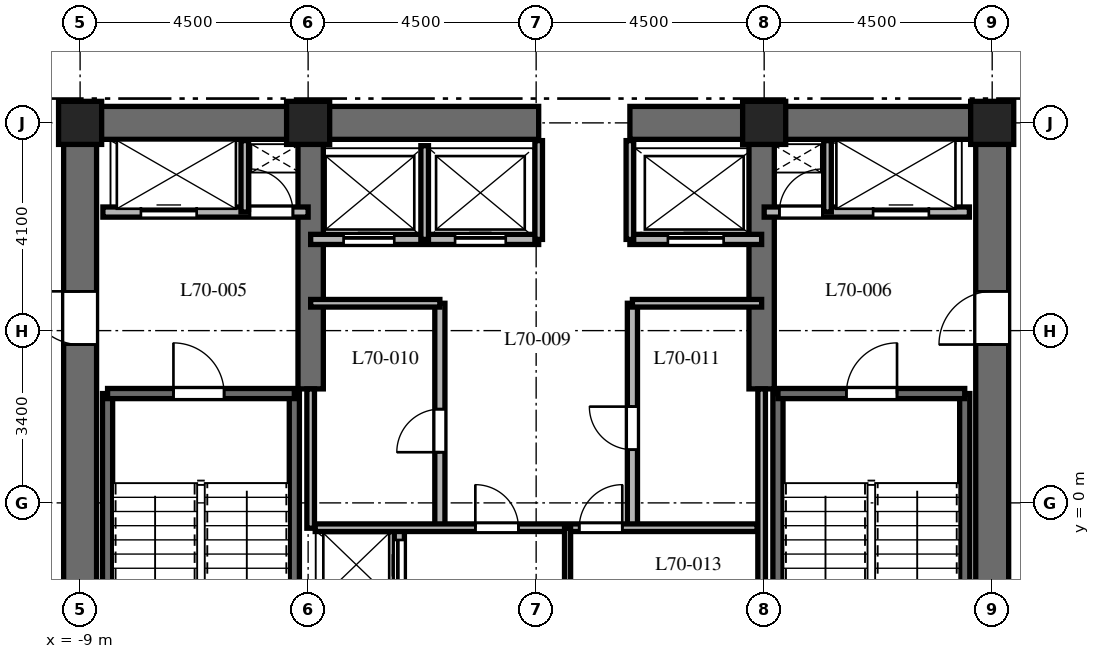
"""IFC4 building model, lengths in metres.
Left out: names, types, materials, properties, quantities, classifications, styles, units other than length and angle.
Written with IfcOpenShell. Run it as: python <this file> out.ifc"""

import sys

from ifc_helpers import new_model, si_unit, direction, frame, frame_2d, origin, origin_2d, place, context, subcontext, project, spatial, rectangle, extrude, element, fill, save


model = new_model("IFC4")
c1 = context("Model", 3, precision=1e-05, world=origin(), true_north=direction((0.0, 1.0)))
c2 = subcontext(c1, "Body", "Model", "MODEL_VIEW")
j1 = project(units=[si_unit("LENGTHUNIT", "METRE"), si_unit("PLANEANGLEUNIT", "RADIAN")], contexts=[c1])
p1 = place(None, origin())
s1 = spatial("IfcSite", under=j1, at=p1, CompositionType="ELEMENT")
p2 = place(p1, origin())
s2 = spatial("IfcBuilding", under=s1, at=p2, CompositionType="ELEMENT")
p3 = place(p2, frame((0.0, 0.0, 280.8)))
s3 = spatial("IfcBuildingStorey", under=s2, at=p3, CompositionType="ELEMENT", Elevation=280.8)
p4 = place(p3, frame((-9.325, 7.5, 0.0), z_axis=(0.0, 0.0, 1.0), x_axis=(1.0, 0.0, 0.0)))
e1 = element("IfcWall", 1, at=p4, inside=s3, PredefinedType="SHEAR", context=c2, shape_type="SweptSolid", body=[
    extrude(rectangle(XDim=9.375, YDim=0.65, at=frame_2d((4.688, 0.0))), origin(), (0.0, 0.0, 1.0), 3.9),
])
p5 = place(p3, frame((1.85, 7.5, 0.0), z_axis=(0.0, 0.0, 1.0), x_axis=(1.0, 0.0, 0.0)))
e2 = element("IfcWall", 2, at=p5, inside=s3, PredefinedType="SHEAR", context=c2, shape_type="SweptSolid", body=[
    extrude(rectangle(XDim=7.475, YDim=0.65, at=frame_2d((3.737, 0.0))), origin(), (0.0, 0.0, 1.0), 3.9),
])
p6 = place(p3, frame((-9.0, -7.175, 0.0), z_axis=(0.0, 0.0, 1.0), x_axis=(0.0, 1.0, 0.0)))
e3 = element("IfcWall", 3, at=p6, inside=s3, PredefinedType="SHEAR", context=c2, shape_type="SweptSolid", body=[
    extrude(rectangle(XDim=14.35, YDim=0.65, at=frame_2d((7.175, 0.0))), origin(), (0.0, 0.0, 1.0), 3.9),
])
p7 = place(p6, frame((10.3, 0.0, 0.0)))
e4 = element("IfcOpeningElement", 4, at=p7, cuts=e3, PredefinedType="OPENING", context=c2, shape_type="SweptSolid", body=[
    extrude(rectangle(XDim=1.05, YDim=2.15, at=frame_2d((0.525, 1.075))), frame((0.0, 0.335, 0.0), z_axis=(0.0, -1.0, 0.0), x_axis=(1.0, 0.0, 0.0)), (0.0, 0.0, 1.0), 0.67),
])
p8 = place(p3, frame((9.0, -7.175, 0.0), z_axis=(0.0, 0.0, 1.0), x_axis=(0.0, 1.0, 0.0)))
e5 = element("IfcWall", 5, at=p8, inside=s3, PredefinedType="SHEAR", context=c2, shape_type="SweptSolid", body=[
    extrude(rectangle(XDim=14.35, YDim=0.65, at=frame_2d((7.175, 0.0))), origin(), (0.0, 0.0, 1.0), 3.9),
])
p9 = place(p8, frame((10.3, 0.0, 0.0)))
e6 = element("IfcOpeningElement", 6, at=p9, cuts=e5, PredefinedType="OPENING", context=c2, shape_type="SweptSolid", body=[
    extrude(rectangle(XDim=1.05, YDim=2.15, at=frame_2d((0.525, 1.075))), frame((0.0, 0.335, 0.0), z_axis=(0.0, -1.0, 0.0), x_axis=(1.0, 0.0, 0.0)), (0.0, 0.0, 1.0), 0.67),
])
for number, where, z_axis, x_axis in (
    (7, (-4.45, 2.25, 0.0), (0.0, 0.0, 1.0), (0.0, 1.0, 0.0)),
    (8, (4.45, 2.25, 0.0), (0.0, 0.0, 1.0), (0.0, 1.0, 0.0)),
):
    element("IfcWall", number, at=place(p3, frame(where, z_axis=z_axis, x_axis=x_axis)), inside=s3, PredefinedType="SHEAR", context=c2, shape_type="SweptSolid", body=[
        extrude(rectangle(XDim=4.925, YDim=0.5, at=frame_2d((2.462, 0.0))), origin(), (0.0, 0.0, 1.0), 3.9),
    ])
for number, where, z_axis, x_axis in (
    (9, (-8.458, -6.985, 0.0), (0.0, 0.0, 1.0), (0.0, 1.0, 0.0)),
    (10, (-4.772, -6.985, 0.0), (0.0, 0.0, 1.0), (0.0, 1.0, 0.0)),
):
    element("IfcWall", number, at=place(p3, frame(where, z_axis=z_axis, x_axis=x_axis)), inside=s3, PredefinedType="SHEAR", context=c2, shape_type="SweptSolid", body=[
        extrude(rectangle(XDim=9.143, YDim=0.2, at=frame_2d((4.572, 0.0))), origin(), (0.0, 0.0, 1.0), 3.9),
    ])
p10 = place(p3, frame((-8.458, 2.158, 0.0), z_axis=(0.0, 0.0, 1.0), x_axis=(1.0, 0.0, 0.0)))
e11 = element("IfcWall", 11, at=p10, inside=s3, PredefinedType="SHEAR", context=c2, shape_type="SweptSolid", body=[
    extrude(rectangle(XDim=3.686, YDim=0.2, at=frame_2d((1.843, 0.0))), origin(), (0.0, 0.0, 1.0), 3.9),
])
p11 = place(p10, frame((1.3, 0.0, 0.0)))
e12 = element("IfcOpeningElement", 12, at=p11, cuts=e11, PredefinedType="OPENING", context=c2, shape_type="SweptSolid", body=[
    extrude(rectangle(XDim=1.0, YDim=2.15, at=frame_2d((0.5, 1.075))), frame((0.0, 0.11, 0.0), z_axis=(0.0, -1.0, 0.0), x_axis=(1.0, 0.0, 0.0)), (0.0, 0.0, 1.0), 0.22),
])
for number, where, z_axis, x_axis in (
    (13, (4.772, -6.985, 0.0), (0.0, 0.0, 1.0), (0.0, 1.0, 0.0)),
    (14, (8.458, -6.985, 0.0), (0.0, 0.0, 1.0), (0.0, 1.0, 0.0)),
):
    element("IfcWall", number, at=place(p3, frame(where, z_axis=z_axis, x_axis=x_axis)), inside=s3, PredefinedType="SHEAR", context=c2, shape_type="SweptSolid", body=[
        extrude(rectangle(XDim=9.143, YDim=0.2, at=frame_2d((4.572, 0.0))), origin(), (0.0, 0.0, 1.0), 3.9),
    ])
p12 = place(p3, frame((4.772, 2.158, 0.0), z_axis=(0.0, 0.0, 1.0), x_axis=(1.0, 0.0, 0.0)))
e15 = element("IfcWall", 15, at=p12, inside=s3, PredefinedType="SHEAR", context=c2, shape_type="SweptSolid", body=[
    extrude(rectangle(XDim=3.686, YDim=0.2, at=frame_2d((1.843, 0.0))), origin(), (0.0, 0.0, 1.0), 3.9),
])
p13 = place(p12, frame((1.35, 0.0, 0.0)))
e16 = element("IfcOpeningElement", 16, at=p13, cuts=e15, PredefinedType="OPENING", context=c2, shape_type="SweptSolid", body=[
    extrude(rectangle(XDim=1.0, YDim=2.15, at=frame_2d((0.5, 1.075))), frame((0.0, 0.11, 0.0), z_axis=(0.0, -1.0, 0.0), x_axis=(1.0, 0.0, 0.0)), (0.0, 0.0, 1.0), 0.22),
])
for number, where, z_axis, x_axis in (
    (17, (9.0, 7.5, 0.0), (0.0, 0.0, 1.0), (1.0, 0.0, 0.0)),
    (18, (4.5, 7.5, 0.0), (0.0, 0.0, 1.0), (1.0, 0.0, 0.0)),
    (19, (-4.5, 7.5, 0.0), (0.0, 0.0, 1.0), (1.0, 0.0, 0.0)),
    (20, (-9.0, 7.5, 0.0), (0.0, 0.0, 1.0), (1.0, 0.0, 0.0)),
):
    element("IfcColumn", number, at=place(p3, frame(where, z_axis=z_axis, x_axis=x_axis)), inside=s3, PredefinedType="COLUMN", context=c2, shape_type="SweptSolid", body=[
        extrude(rectangle(XDim=0.85, YDim=0.85, at=origin_2d()), origin(), (0.0, 0.0, 1.0), 3.9),
    ])
p14 = place(p3, frame((-8.55, 5.74, 0.0), z_axis=(0.0, 0.0, 1.0), x_axis=(1.0, 0.0, 0.0)))
e21 = element("IfcWall", 21, at=p14, inside=s3, PredefinedType="PARTITIONING", context=c2, shape_type="SweptSolid", body=[
    extrude(rectangle(XDim=4.05, YDim=0.2, at=frame_2d((2.025, 0.0))), origin(), (0.0, 0.0, 1.0), 3.6),
])
p15 = place(p14, frame((0.75, 0.0, 0.0)))
e22 = element("IfcOpeningElement", 22, at=p15, cuts=e21, PredefinedType="OPENING", context=c2, shape_type="SweptSolid", body=[
    extrude(rectangle(XDim=1.1, YDim=2.2, at=frame_2d((0.55, 1.1))), frame((0.0, 0.11, 0.0), z_axis=(0.0, -1.0, 0.0), x_axis=(1.0, 0.0, 0.0)), (0.0, 0.0, 1.0), 0.22),
])
p16 = place(p14, frame((2.9, 0.0, 0.0)))
e23 = element("IfcOpeningElement", 23, at=p16, cuts=e21, PredefinedType="OPENING", context=c2, shape_type="SweptSolid", body=[
    extrude(rectangle(XDim=0.85, YDim=2.03, at=frame_2d((0.425, 1.015))), frame((0.0, 0.11, 0.0), z_axis=(0.0, -1.0, 0.0), x_axis=(1.0, 0.0, 0.0)), (0.0, 0.0, 1.0), 0.22),
])
p17 = place(p3, frame((-5.75, 5.74, 0.0), z_axis=(0.0, 0.0, 1.0), x_axis=(0.0, 1.0, 0.0)))
e24 = element("IfcWall", 24, at=p17, inside=s3, PredefinedType="PARTITIONING", context=c2, shape_type="SweptSolid", body=[
    extrude(rectangle(XDim=1.41, YDim=0.15, at=frame_2d((0.705, 0.0))), origin(), (0.0, 0.0, 1.0), 3.6),
])
p18 = place(p3, frame((4.5, 5.74, 0.0), z_axis=(0.0, 0.0, 1.0), x_axis=(1.0, 0.0, 0.0)))
e25 = element("IfcWall", 25, at=p18, inside=s3, PredefinedType="PARTITIONING", context=c2, shape_type="SweptSolid", body=[
    extrude(rectangle(XDim=4.05, YDim=0.2, at=frame_2d((2.025, 0.0))), origin(), (0.0, 0.0, 1.0), 3.6),
])
p19 = place(p18, frame((0.3, 0.0, 0.0)))
e26 = element("IfcOpeningElement", 26, at=p19, cuts=e25, PredefinedType="OPENING", context=c2, shape_type="SweptSolid", body=[
    extrude(rectangle(XDim=0.85, YDim=2.03, at=frame_2d((0.425, 1.015))), frame((0.0, 0.11, 0.0), z_axis=(0.0, -1.0, 0.0), x_axis=(1.0, 0.0, 0.0)), (0.0, 0.0, 1.0), 0.22),
])
p20 = place(p18, frame((2.15, 0.0, 0.0)))
e27 = element("IfcOpeningElement", 27, at=p20, cuts=e25, PredefinedType="OPENING", context=c2, shape_type="SweptSolid", body=[
    extrude(rectangle(XDim=1.1, YDim=2.2, at=frame_2d((0.55, 1.1))), frame((0.0, 0.11, 0.0), z_axis=(0.0, -1.0, 0.0), x_axis=(1.0, 0.0, 0.0)), (0.0, 0.0, 1.0), 0.22),
])
p21 = place(p3, frame((5.75, 5.74, 0.0), z_axis=(0.0, 0.0, 1.0), x_axis=(0.0, 1.0, 0.0)))
e28 = element("IfcWall", 28, at=p21, inside=s3, PredefinedType="PARTITIONING", context=c2, shape_type="SweptSolid", body=[
    extrude(rectangle(XDim=1.41, YDim=0.15, at=frame_2d((0.705, 0.0))), origin(), (0.0, 0.0, 1.0), 3.6),
])
p22 = place(p3, frame((-2.7, -1.972, 0.0), z_axis=(0.0, 0.0, 1.0), x_axis=(0.0, 1.0, 0.0)))
e29 = element("IfcWall", 29, at=p22, inside=s3, PredefinedType="PARTITIONING", context=c2, shape_type="SweptSolid", body=[
    extrude(rectangle(XDim=1.472, YDim=0.2, at=frame_2d((0.736, 0.0))), origin(), (0.0, 0.0, 1.0), 3.6),
])
p23 = place(p22, frame((0.24, 0.0, 0.0)))
e30 = element("IfcOpeningElement", 30, at=p23, cuts=e29, PredefinedType="OPENING", context=c2, shape_type="SweptSolid", body=[
    extrude(rectangle(XDim=1.0, YDim=2.2, at=frame_2d((0.5, 1.1))), frame((0.0, 0.11, 0.0), z_axis=(0.0, -1.0, 0.0), x_axis=(1.0, 0.0, 0.0)), (0.0, 0.0, 1.0), 0.22),
])
p24 = place(p3, frame((-4.45, 5.2, 0.0), z_axis=(0.0, 0.0, 1.0), x_axis=(1.0, 0.0, 0.0)))
e31 = element("IfcWall", 31, at=p24, inside=s3, PredefinedType="PARTITIONING", context=c2, shape_type="SweptSolid", body=[
    extrude(rectangle(XDim=4.5, YDim=0.2, at=frame_2d((2.25, 0.0))), origin(), (0.0, 0.0, 1.0), 3.6),
])
p25 = place(p24, frame((0.65, 0.0, 0.0)))
e32 = element("IfcOpeningElement", 32, at=p25, cuts=e31, PredefinedType="OPENING", context=c2, shape_type="SweptSolid", body=[
    extrude(rectangle(XDim=1.0, YDim=2.2, at=frame_2d((0.5, 1.1))), frame((0.0, 0.11, 0.0), z_axis=(0.0, -1.0, 0.0), x_axis=(1.0, 0.0, 0.0)), (0.0, 0.0, 1.0), 0.22),
])
p26 = place(p24, frame((2.85, 0.0, 0.0)))
e33 = element("IfcOpeningElement", 33, at=p26, cuts=e31, PredefinedType="OPENING", context=c2, shape_type="SweptSolid", body=[
    extrude(rectangle(XDim=1.0, YDim=2.2, at=frame_2d((0.5, 1.1))), frame((0.0, 0.11, 0.0), z_axis=(0.0, -1.0, 0.0), x_axis=(1.0, 0.0, 0.0)), (0.0, 0.0, 1.0), 0.22),
])
p27 = place(p3, frame((1.85, 5.2, 0.0), z_axis=(0.0, 0.0, 1.0), x_axis=(1.0, 0.0, 0.0)))
e34 = element("IfcWall", 34, at=p27, inside=s3, PredefinedType="PARTITIONING", context=c2, shape_type="SweptSolid", body=[
    extrude(rectangle(XDim=2.6, YDim=0.2, at=frame_2d((1.3, 0.0))), origin(), (0.0, 0.0, 1.0), 3.6),
])
p28 = place(p27, frame((0.75, 0.0, 0.0)))
e35 = element("IfcOpeningElement", 35, at=p28, cuts=e34, PredefinedType="OPENING", context=c2, shape_type="SweptSolid", body=[
    extrude(rectangle(XDim=1.1, YDim=2.2, at=frame_2d((0.55, 1.1))), frame((0.0, 0.11, 0.0), z_axis=(0.0, -1.0, 0.0), x_axis=(1.0, 0.0, 0.0)), (0.0, 0.0, 1.0), 0.22),
])
p29 = place(p3, frame((-2.2, 5.2, 0.0), z_axis=(0.0, 0.0, 1.0), x_axis=(0.0, 1.0, 0.0)))
e36 = element("IfcWall", 36, at=p29, inside=s3, PredefinedType="PARTITIONING", context=c2, shape_type="SweptSolid", body=[
    extrude(rectangle(XDim=1.85, YDim=0.15, at=frame_2d((0.925, 0.0))), origin(), (0.0, 0.0, 1.0), 3.6),
])
for number, where, z_axis, x_axis in (
    (37, (0.05, 5.2, 0.0), (0.0, 0.0, 1.0), (0.0, 1.0, 0.0)),
    (38, (1.85, 5.2, 0.0), (0.0, 0.0, 1.0), (0.0, 1.0, 0.0)),
):
    element("IfcWall", number, at=place(p3, frame(where, z_axis=z_axis, x_axis=x_axis)), inside=s3, PredefinedType="PARTITIONING", context=c2, shape_type="SweptSolid", body=[
        extrude(rectangle(XDim=1.95, YDim=0.15, at=frame_2d((0.975, 0.0))), origin(), (0.0, 0.0, 1.0), 3.6),
    ])
p30 = place(p3, frame((-4.45, -0.5, 0.0), z_axis=(0.0, 0.0, 1.0), x_axis=(0.0, 1.0, 0.0)))
e39 = element("IfcWall", 39, at=p30, inside=s3, PredefinedType="PARTITIONING", context=c2, shape_type="SweptSolid", body=[
    extrude(rectangle(XDim=2.75, YDim=0.15, at=frame_2d((1.375, 0.0))), origin(), (0.0, 0.0, 1.0), 3.6),
])
p31 = place(p3, frame((4.45, -1.972, 0.0), z_axis=(0.0, 0.0, 1.0), x_axis=(0.0, 1.0, 0.0)))
e40 = element("IfcWall", 40, at=p31, inside=s3, PredefinedType="PARTITIONING", context=c2, shape_type="SweptSolid", body=[
    extrude(rectangle(XDim=4.222, YDim=0.15, at=frame_2d((2.111, 0.0))), origin(), (0.0, 0.0, 1.0), 3.6),
])
p32 = place(p3, frame((-1.9, -0.5, 0.0), z_axis=(0.0, 0.0, 1.0), x_axis=(0.0, 1.0, 0.0)))
e41 = element("IfcWall", 41, at=p32, inside=s3, PredefinedType="PARTITIONING", context=c2, shape_type="SweptSolid", body=[
    extrude(rectangle(XDim=4.44, YDim=0.2, at=frame_2d((2.22, 0.0))), origin(), (0.0, 0.0, 1.0), 3.6),
])
p33 = place(p32, frame((1.5, 0.0, 0.0)))
e42 = element("IfcOpeningElement", 42, at=p33, cuts=e41, PredefinedType="OPENING", context=c2, shape_type="SweptSolid", body=[
    extrude(rectangle(XDim=0.85, YDim=2.03, at=frame_2d((0.425, 1.015))), frame((0.0, 0.11, 0.0), z_axis=(0.0, -1.0, 0.0), x_axis=(1.0, 0.0, 0.0)), (0.0, 0.0, 1.0), 0.22),
])
p34 = place(p3, frame((-4.45, 3.94, 0.0), z_axis=(0.0, 0.0, 1.0), x_axis=(1.0, 0.0, 0.0)))
e43 = element("IfcWall", 43, at=p34, inside=s3, PredefinedType="PARTITIONING", context=c2, shape_type="SweptSolid", body=[
    extrude(rectangle(XDim=2.55, YDim=0.15, at=frame_2d((1.275, 0.0))), origin(), (0.0, 0.0, 1.0), 3.6),
])
p35 = place(p3, frame((1.9, -0.5, 0.0), z_axis=(0.0, 0.0, 1.0), x_axis=(0.0, 1.0, 0.0)))
e44 = element("IfcWall", 44, at=p35, inside=s3, PredefinedType="PARTITIONING", context=c2, shape_type="SweptSolid", body=[
    extrude(rectangle(XDim=4.44, YDim=0.2, at=frame_2d((2.22, 0.0))), origin(), (0.0, 0.0, 1.0), 3.6),
])
p36 = place(p35, frame((1.55, 0.0, 0.0)))
e45 = element("IfcOpeningElement", 45, at=p36, cuts=e44, PredefinedType="OPENING", context=c2, shape_type="SweptSolid", body=[
    extrude(rectangle(XDim=0.85, YDim=2.03, at=frame_2d((0.425, 1.015))), frame((0.0, 0.11, 0.0), z_axis=(0.0, -1.0, 0.0), x_axis=(1.0, 0.0, 0.0)), (0.0, 0.0, 1.0), 0.22),
])
p37 = place(p3, frame((1.9, 3.94, 0.0), z_axis=(0.0, 0.0, 1.0), x_axis=(1.0, 0.0, 0.0)))
e46 = element("IfcWall", 46, at=p37, inside=s3, PredefinedType="PARTITIONING", context=c2, shape_type="SweptSolid", body=[
    extrude(rectangle(XDim=2.55, YDim=0.15, at=frame_2d((1.275, 0.0))), origin(), (0.0, 0.0, 1.0), 3.6),
])
p38 = place(p3, frame((-4.36, -0.49, 0.0), z_axis=(0.0, 0.0, 1.0), x_axis=(1.0, 0.0, 0.0)))
e47 = element("IfcWall", 47, at=p38, inside=s3, PredefinedType="PARTITIONING", context=c2, shape_type="SweptSolid", body=[
    extrude(rectangle(XDim=8.72, YDim=0.15, at=frame_2d((4.36, 0.0))), origin(), (0.0, 0.0, 1.0), 3.6),
])
p39 = place(p38, frame((3.16, 0.0, 0.0)))
e48 = element("IfcOpeningElement", 48, at=p39, cuts=e47, PredefinedType="OPENING", context=c2, shape_type="SweptSolid", body=[
    extrude(rectangle(XDim=0.85, YDim=2.03, at=frame_2d((0.425, 1.015))), frame((0.0, 0.085, 0.0), z_axis=(0.0, -1.0, 0.0), x_axis=(1.0, 0.0, 0.0)), (0.0, 0.0, 1.0), 0.17),
])
p40 = place(p38, frame((5.21, 0.0, 0.0)))
e49 = element("IfcOpeningElement", 49, at=p40, cuts=e47, PredefinedType="OPENING", context=c2, shape_type="SweptSolid", body=[
    extrude(rectangle(XDim=0.85, YDim=2.03, at=frame_2d((0.425, 1.015))), frame((0.0, 0.085, 0.0), z_axis=(0.0, -1.0, 0.0), x_axis=(1.0, 0.0, 0.0)), (0.0, 0.0, 1.0), 0.17),
])
p41 = place(p3, frame((0.62, -1.972, 0.0), z_axis=(0.0, 0.0, 1.0), x_axis=(0.0, 1.0, 0.0)))
e50 = element("IfcWall", 50, at=p41, inside=s3, PredefinedType="PARTITIONING", context=c2, shape_type="SweptSolid", body=[
    extrude(rectangle(XDim=1.472, YDim=0.12, at=frame_2d((0.736, 0.0))), origin(), (0.0, 0.0, 1.0), 3.6),
])
p42 = place(p11, origin())
e51 = element("IfcDoor", 51, at=p42, inside=s3, OperationType="SINGLE_SWING_LEFT", PredefinedType="DOOR", context=c2, shape_type="SweptSolid", body=[
    extrude(rectangle(XDim=1.0, YDim=2.15, at=frame_2d((0.5, 1.075))), frame((0.0, 0.025, 0.0), z_axis=(0.0, -1.0, 0.0), x_axis=(1.0, 0.0, 0.0)), (0.0, 0.0, 1.0), 0.05),
])
fill(e12, e51)
p43 = place(p13, origin())
e52 = element("IfcDoor", 52, at=p43, inside=s3, OperationType="SINGLE_SWING_RIGHT", PredefinedType="DOOR", context=c2, shape_type="SweptSolid", body=[
    extrude(rectangle(XDim=1.0, YDim=2.15, at=frame_2d((0.5, 1.075))), frame((0.0, 0.025, 0.0), z_axis=(0.0, -1.0, 0.0), x_axis=(1.0, 0.0, 0.0)), (0.0, 0.0, 1.0), 0.05),
])
fill(e16, e52)
p44 = place(p7, origin())
e53 = element("IfcDoor", 53, at=p44, inside=s3, OperationType="SINGLE_SWING_RIGHT", PredefinedType="DOOR", context=c2, shape_type="SweptSolid", body=[
    extrude(rectangle(XDim=1.05, YDim=2.15, at=frame_2d((0.525, 1.075))), frame((0.0, 0.025, 0.0), z_axis=(0.0, -1.0, 0.0), x_axis=(1.0, 0.0, 0.0)), (0.0, 0.0, 1.0), 0.05),
])
fill(e4, e53)
p45 = place(p9, origin())
e54 = element("IfcDoor", 54, at=p45, inside=s3, OperationType="SINGLE_SWING_LEFT", PredefinedType="DOOR", context=c2, shape_type="SweptSolid", body=[
    extrude(rectangle(XDim=1.05, YDim=2.15, at=frame_2d((0.525, 1.075))), frame((0.0, 0.025, 0.0), z_axis=(0.0, -1.0, 0.0), x_axis=(1.0, 0.0, 0.0)), (0.0, 0.0, 1.0), 0.05),
])
fill(e6, e54)
p46 = place(p15, origin())
e55 = element("IfcDoor", 55, at=p46, inside=s3, OperationType="SLIDING_TO_LEFT", PredefinedType="DOOR", context=c2, shape_type="SweptSolid", body=[
    extrude(rectangle(XDim=1.1, YDim=2.2, at=frame_2d((0.55, 1.1))), frame((0.0, 0.025, 0.0), z_axis=(0.0, -1.0, 0.0), x_axis=(1.0, 0.0, 0.0)), (0.0, 0.0, 1.0), 0.05),
])
fill(e22, e55)
p47 = place(p16, origin())
e56 = element("IfcDoor", 56, at=p47, inside=s3, OperationType="SINGLE_SWING_LEFT", PredefinedType="DOOR", context=c2, shape_type="SweptSolid", body=[
    extrude(rectangle(XDim=0.85, YDim=2.03, at=frame_2d((0.425, 1.015))), frame((0.0, 0.025, 0.0), z_axis=(0.0, -1.0, 0.0), x_axis=(1.0, 0.0, 0.0)), (0.0, 0.0, 1.0), 0.05),
])
fill(e23, e56)
p48 = place(p19, origin())
e57 = element("IfcDoor", 57, at=p48, inside=s3, OperationType="SINGLE_SWING_RIGHT", PredefinedType="DOOR", context=c2, shape_type="SweptSolid", body=[
    extrude(rectangle(XDim=0.85, YDim=2.03, at=frame_2d((0.425, 1.015))), frame((0.0, 0.025, 0.0), z_axis=(0.0, -1.0, 0.0), x_axis=(1.0, 0.0, 0.0)), (0.0, 0.0, 1.0), 0.05),
])
fill(e26, e57)
p49 = place(p20, origin())
e58 = element("IfcDoor", 58, at=p49, inside=s3, OperationType="SLIDING_TO_RIGHT", PredefinedType="DOOR", context=c2, shape_type="SweptSolid", body=[
    extrude(rectangle(XDim=1.1, YDim=2.2, at=frame_2d((0.55, 1.1))), frame((0.0, 0.025, 0.0), z_axis=(0.0, -1.0, 0.0), x_axis=(1.0, 0.0, 0.0)), (0.0, 0.0, 1.0), 0.05),
])
fill(e27, e58)
p50 = place(p23, origin())
e59 = element("IfcDoor", 59, at=p50, inside=s3, OperationType="SLIDING_TO_LEFT", PredefinedType="DOOR", context=c2, shape_type="SweptSolid", body=[
    extrude(rectangle(XDim=1.0, YDim=2.2, at=frame_2d((0.5, 1.1))), frame((0.0, 0.025, 0.0), z_axis=(0.0, -1.0, 0.0), x_axis=(1.0, 0.0, 0.0)), (0.0, 0.0, 1.0), 0.05),
])
fill(e30, e59)
p51 = place(p25, origin())
e60 = element("IfcDoor", 60, at=p51, inside=s3, OperationType="SLIDING_TO_LEFT", PredefinedType="DOOR", context=c2, shape_type="SweptSolid", body=[
    extrude(rectangle(XDim=1.0, YDim=2.2, at=frame_2d((0.5, 1.1))), frame((0.0, 0.025, 0.0), z_axis=(0.0, -1.0, 0.0), x_axis=(1.0, 0.0, 0.0)), (0.0, 0.0, 1.0), 0.05),
])
fill(e32, e60)
p52 = place(p26, origin())
e61 = element("IfcDoor", 61, at=p52, inside=s3, OperationType="SLIDING_TO_RIGHT", PredefinedType="DOOR", context=c2, shape_type="SweptSolid", body=[
    extrude(rectangle(XDim=1.0, YDim=2.2, at=frame_2d((0.5, 1.1))), frame((0.0, 0.025, 0.0), z_axis=(0.0, -1.0, 0.0), x_axis=(1.0, 0.0, 0.0)), (0.0, 0.0, 1.0), 0.05),
])
fill(e33, e61)
p53 = place(p28, origin())
e62 = element("IfcDoor", 62, at=p53, inside=s3, OperationType="SLIDING_TO_RIGHT", PredefinedType="DOOR", context=c2, shape_type="SweptSolid", body=[
    extrude(rectangle(XDim=1.1, YDim=2.2, at=frame_2d((0.55, 1.1))), frame((0.0, 0.025, 0.0), z_axis=(0.0, -1.0, 0.0), x_axis=(1.0, 0.0, 0.0)), (0.0, 0.0, 1.0), 0.05),
])
fill(e35, e62)
p54 = place(p33, origin())
e63 = element("IfcDoor", 63, at=p54, inside=s3, OperationType="SINGLE_SWING_LEFT", PredefinedType="DOOR", context=c2, shape_type="SweptSolid", body=[
    extrude(rectangle(XDim=0.85, YDim=2.03, at=frame_2d((0.425, 1.015))), frame((0.0, 0.025, 0.0), z_axis=(0.0, -1.0, 0.0), x_axis=(1.0, 0.0, 0.0)), (0.0, 0.0, 1.0), 0.05),
])
fill(e42, e63)
p55 = place(p36, origin())
e64 = element("IfcDoor", 64, at=p55, inside=s3, OperationType="SINGLE_SWING_RIGHT", PredefinedType="DOOR", context=c2, shape_type="SweptSolid", body=[
    extrude(rectangle(XDim=0.85, YDim=2.03, at=frame_2d((0.425, 1.015))), frame((0.0, 0.025, 0.0), z_axis=(0.0, -1.0, 0.0), x_axis=(1.0, 0.0, 0.0)), (0.0, 0.0, 1.0), 0.05),
])
fill(e45, e64)
p56 = place(p39, origin())
e65 = element("IfcDoor", 65, at=p56, inside=s3, OperationType="SINGLE_SWING_LEFT", PredefinedType="DOOR", context=c2, shape_type="SweptSolid", body=[
    extrude(rectangle(XDim=0.85, YDim=2.03, at=frame_2d((0.425, 1.015))), frame((0.0, 0.025, 0.0), z_axis=(0.0, -1.0, 0.0), x_axis=(1.0, 0.0, 0.0)), (0.0, 0.0, 1.0), 0.05),
])
fill(e48, e65)
p57 = place(p40, origin())
e66 = element("IfcDoor", 66, at=p57, inside=s3, OperationType="SINGLE_SWING_RIGHT", PredefinedType="DOOR", context=c2, shape_type="SweptSolid", body=[
    extrude(rectangle(XDim=0.85, YDim=2.03, at=frame_2d((0.425, 1.015))), frame((0.0, 0.025, 0.0), z_axis=(0.0, -1.0, 0.0), x_axis=(1.0, 0.0, 0.0)), (0.0, 0.0, 1.0), 0.05),
])
fill(e49, e66)
save(model, sys.argv[1])
